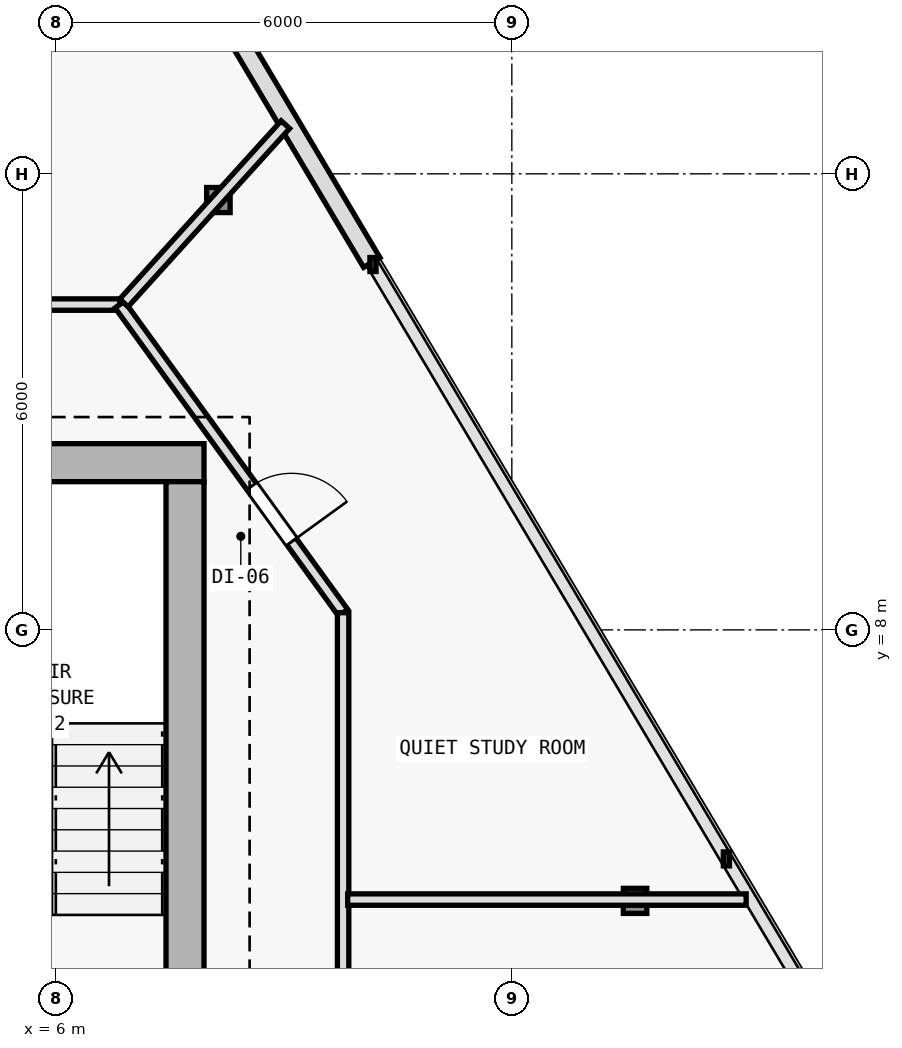
"""IFC4 building model, lengths in metres.
Left out: names, types, materials, properties, quantities, classifications, styles, units other than length and angle.
Written with IfcOpenShell. Run it as: python <this file> out.ifc"""

import sys

from ifc_helpers import new_model, si_unit, direction, frame, frame_2d, origin, origin_2d, place, context, subcontext, project, spatial, rectangle, i_section, extrude, element, fill, save


model = new_model("IFC4")
c1 = context("Model", 3, precision=1e-05, world=origin(), true_north=direction((0.0, 1.0)))
c2 = subcontext(c1, "Body", "Model", "MODEL_VIEW")
j1 = project(units=[si_unit("LENGTHUNIT", "METRE"), si_unit("PLANEANGLEUNIT", "RADIAN")], contexts=[c1])
p1 = place(None, origin())
s1 = spatial("IfcSite", under=j1, at=p1, CompositionType="ELEMENT")
p2 = place(p1, origin())
s2 = spatial("IfcBuilding", under=s1, at=p2, CompositionType="ELEMENT")
p3 = place(p2, frame((0.0, 0.0, 268.8)))
s3 = spatial("IfcBuildingStorey", under=s2, at=p3, CompositionType="ELEMENT", Elevation=268.8)
p4 = place(p3, frame((7.7, 10.2, 0.0), z_axis=(0.0, 0.0, 1.0), x_axis=(1.0, 0.0, 0.0)))
e1 = element("IfcColumn", 1, at=p4, inside=s3, PredefinedType="COLUMN", context=c2, shape_type="SweptSolid", body=[
    extrude(i_section(OverallWidth=0.374, OverallDepth=0.372, WebThickness=0.012, FlangeThickness=0.02, FilletRadius=0.015, at=origin_2d()), origin(), (0.0, 0.0, 1.0), 3.6),
])
p5 = place(p3, frame((13.622, 4.435, 0.005), z_axis=(-0.018906028715, 0.009589028952, 0.999775281052), x_axis=(-0.452339157861, -0.891845999187, 0.0)))
e2 = element("IfcColumn", 2, at=p5, inside=s3, PredefinedType="COLUMN", context=c2, shape_type="SweptSolid", body=[
    extrude(i_section(OverallWidth=0.309, OverallDepth=0.33, WebThickness=0.011, FlangeThickness=0.019, FilletRadius=0.027, at=origin_2d()), origin(), (0.0, 0.0, 1.0), 3.59),
])
p6 = place(p3, frame((8.139, 13.655, 0.005), z_axis=(-0.011699044583, -0.00258467264, 0.999928223336), x_axis=(0.215728093413, -0.976453475447, 0.0)))
e3 = element("IfcColumn", 3, at=p6, inside=s3, PredefinedType="COLUMN", context=c2, shape_type="SweptSolid", body=[
    extrude(i_section(OverallWidth=0.309, OverallDepth=0.33, WebThickness=0.011, FlangeThickness=0.019, FilletRadius=0.027, at=origin_2d()), origin(), (0.0, 0.0, 1.0), 3.589),
])
p7 = place(p3, frame((5.24, 21.103, 0.0), z_axis=(0.0, 0.0, 1.0), x_axis=(0.511088566076, -0.859528055171, 0.0)))
e4 = element("IfcWall", 4, at=p7, inside=s3, PredefinedType="SOLIDWALL", context=c2, shape_type="SweptSolid", body=[
    extrude(rectangle(XDim=9.622, YDim=0.25, at=frame_2d((4.811, 0.0))), origin(), (0.0, 0.0, 1.0), 3.35),
])
p8 = place(p7, frame((4.061, 0.0, 0.62)))
e5 = element("IfcOpeningElement", 5, at=p8, cuts=e4, PredefinedType="OPENING", context=c2, shape_type="SweptSolid", body=[
    extrude(rectangle(XDim=1.5, YDim=2.0, at=frame_2d((0.75, 1.0))), frame((0.0, 0.135, 0.0), z_axis=(0.0, -1.0, 0.0), x_axis=(1.0, 0.0, 0.0)), (0.0, 0.0, 1.0), 0.27),
])
p9 = place(p3, frame((7.95, 10.2, 0.0), z_axis=(0.0, 0.0, 1.0), x_axis=(-1.0, 0.0, 0.0)))
e6 = element("IfcWall", 6, at=p9, inside=s3, PredefinedType="SHEAR", context=c2, shape_type="SweptSolid", body=[
    extrude(rectangle(XDim=15.9, YDim=0.5, at=frame_2d((7.95, 0.0))), origin(), (0.0, 0.0, 1.0), 3.35),
])
p10 = place(p9, frame((4.4, 0.0, 0.0)))
e7 = element("IfcOpeningElement", 7, at=p10, cuts=e6, PredefinedType="OPENING", context=c2, shape_type="SweptSolid", body=[
    extrude(rectangle(XDim=1.1, YDim=2.15, at=frame_2d((0.55, 1.075))), frame((0.0, 0.26, 0.0), z_axis=(0.0, -1.0, 0.0), x_axis=(1.0, 0.0, 0.0)), (0.0, 0.0, 1.0), 0.52),
])
p11 = place(p3, frame((7.7, 9.95, 0.0), z_axis=(0.0, 0.0, 1.0), x_axis=(0.0, -1.0, 0.0)))
e8 = element("IfcWall", 8, at=p11, inside=s3, PredefinedType="SHEAR", context=c2, shape_type="SweptSolid", body=[
    extrude(rectangle(XDim=19.1, YDim=0.5, at=frame_2d((9.55, 0.0))), origin(), (0.0, 0.0, 1.0), 3.35),
])
p12 = place(p3, frame((-6.841, 12.28, 0.0), z_axis=(0.0, 0.0, 1.0), x_axis=(1.0, 0.0, 0.0)))
e9 = element("IfcWall", 9, at=p12, inside=s3, PredefinedType="PARTITIONING", context=c2, shape_type="SweptSolid", body=[
    extrude(rectangle(XDim=13.682, YDim=0.15, at=frame_2d((6.841, 0.0))), origin(), (0.0, 0.0, 1.0), 3.015),
])
p13 = place(p12, frame((6.391, 0.0, 0.0)))
e10 = element("IfcOpeningElement", 10, at=p13, cuts=e9, PredefinedType="OPENING", context=c2, shape_type="SweptSolid", body=[
    extrude(rectangle(XDim=0.9, YDim=2.1, at=frame_2d((0.45, 1.05))), frame((0.0, 0.085, 0.0), z_axis=(0.0, -1.0, 0.0), x_axis=(1.0, 0.0, 0.0)), (0.0, 0.0, 1.0), 0.17),
])
p14 = place(p3, frame((6.841, 12.28, 0.0), z_axis=(0.0, 0.0, 1.0), x_axis=(0.586956386413, -0.809618552436, 0.0)))
e11 = element("IfcWall", 11, at=p14, inside=s3, PredefinedType="PARTITIONING", context=c2, shape_type="SweptSolid", body=[
    extrude(rectangle(XDim=5.008, YDim=0.15, at=frame_2d((2.504, 0.0))), origin(), (0.0, 0.0, 1.0), 2.995),
])
p15 = place(p14, frame((2.954, 0.0, 0.0)))
e12 = element("IfcOpeningElement", 12, at=p15, cuts=e11, PredefinedType="OPENING", context=c2, shape_type="SweptSolid", body=[
    extrude(rectangle(XDim=0.9, YDim=2.1, at=frame_2d((0.45, 1.05))), frame((0.0, 0.085, 0.0), z_axis=(0.0, -1.0, 0.0), x_axis=(1.0, 0.0, 0.0)), (0.0, 0.0, 1.0), 0.17),
])
p16 = place(p3, frame((9.78, 8.226, 0.0), z_axis=(0.0, 0.0, 1.0), x_axis=(0.0, -1.0, 0.0)))
e13 = element("IfcWall", 13, at=p16, inside=s3, PredefinedType="PARTITIONING", context=c2, shape_type="SweptSolid", body=[
    extrude(rectangle(XDim=19.706, YDim=0.15, at=frame_2d((9.853, 0.0))), origin(), (0.0, 0.0, 1.0), 2.875),
])
p17 = place(p16, frame((15.054, 0.0, 0.0)))
e14 = element("IfcOpeningElement", 14, at=p17, cuts=e13, PredefinedType="OPENING", context=c2, shape_type="SweptSolid", body=[
    extrude(rectangle(XDim=0.9, YDim=2.1, at=frame_2d((0.45, 1.05))), frame((0.0, 0.085, 0.0), z_axis=(0.0, -1.0, 0.0), x_axis=(1.0, 0.0, 0.0)), (0.0, 0.0, 1.0), 0.17),
])
p18 = place(p16, frame((7.177, 0.0, 0.0)))
e15 = element("IfcOpeningElement", 15, at=p18, cuts=e13, PredefinedType="OPENING", context=c2, shape_type="SweptSolid", body=[
    extrude(rectangle(XDim=0.9, YDim=2.1, at=frame_2d((0.45, 1.05))), frame((0.0, 0.085, 0.0), z_axis=(0.0, -1.0, 0.0), x_axis=(1.0, 0.0, 0.0)), (0.0, 0.0, 1.0), 0.17),
])
p19 = place(p3, frame((9.84, 4.452, 0.0), z_axis=(0.0, 0.0, 1.0), x_axis=(1.0, 0.0, 0.0)))
e16 = element("IfcWall", 16, at=p19, inside=s3, PredefinedType="PARTITIONING", context=c2, shape_type="SweptSolid", body=[
    extrude(rectangle(XDim=5.243, YDim=0.15, at=frame_2d((2.622, 0.0))), origin(), (0.0, 0.0, 1.0), 2.995),
])
p20 = place(p3, frame((6.896, 12.302, 0.0), z_axis=(0.0, 0.0, 1.0), x_axis=(0.671420151028, 0.741076906126, 0.0)))
e17 = element("IfcWall", 17, at=p20, inside=s3, PredefinedType="PARTITIONING", context=c2, shape_type="SweptSolid", body=[
    extrude(rectangle(XDim=3.165, YDim=0.15, at=frame_2d((1.583, 0.0))), origin(), (0.0, 0.0, 1.0), 3.015),
])
p21 = place(p15, origin())
e18 = element("IfcDoor", 18, at=p21, inside=s3, OperationType="SINGLE_SWING_RIGHT", PredefinedType="DOOR", context=c2, shape_type="SweptSolid", body=[
    extrude(rectangle(XDim=0.9, YDim=2.1, at=frame_2d((0.45, 1.05))), frame((0.0, 0.025, 0.0), z_axis=(0.0, -1.0, 0.0), x_axis=(1.0, 0.0, 0.0)), (0.0, 0.0, 1.0), 0.05),
])
fill(e12, e18)
save(model, sys.argv[1])
